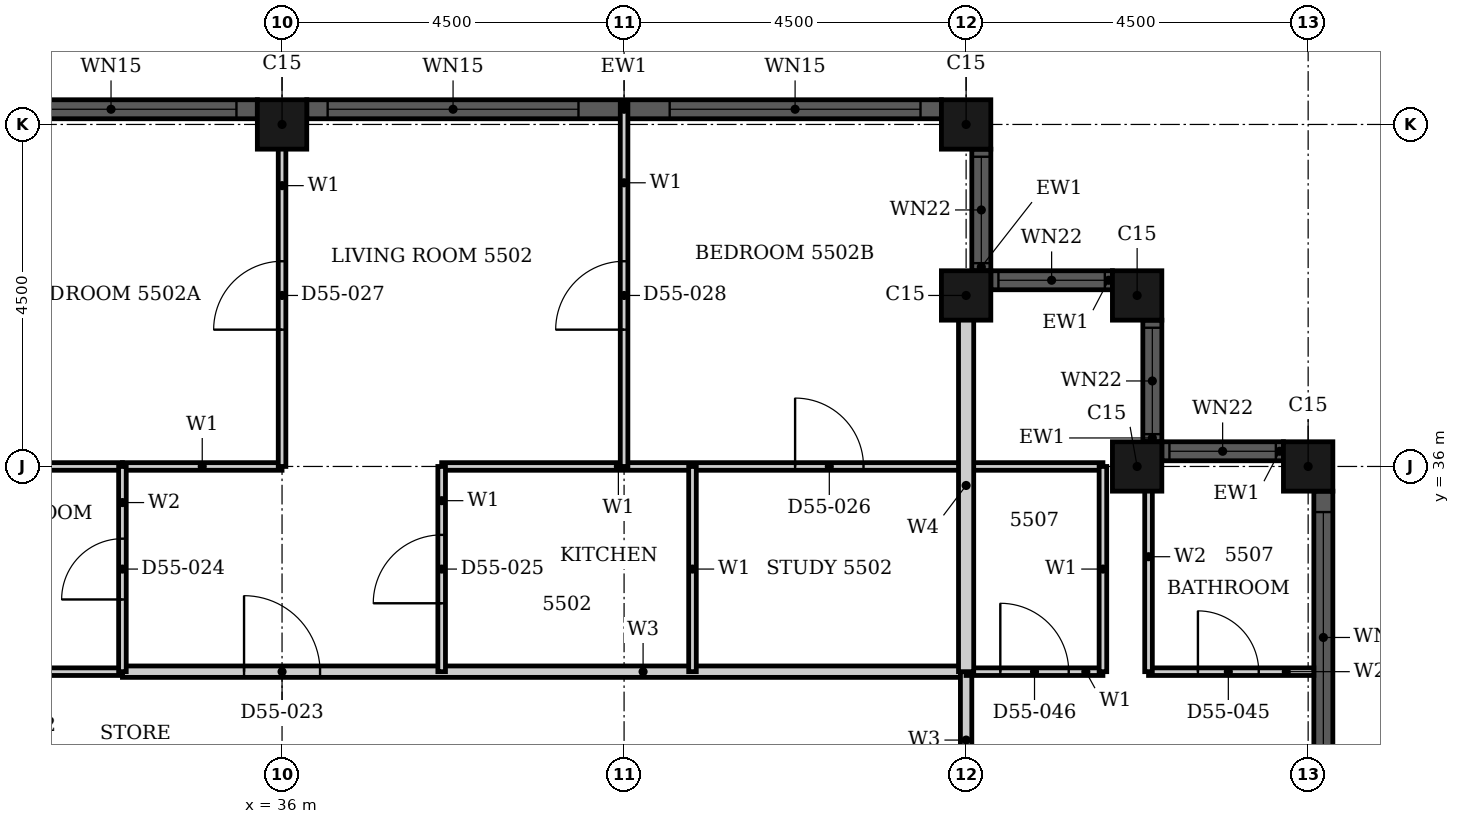
"""IFC4 building model, lengths in metres.
Left out: names, types, materials, properties, quantities, classifications, styles, units other than length and angle.
Written with IfcOpenShell. Run it as: python <this file> out.ifc"""

import sys

from ifc_helpers import new_model, si_unit, direction, frame, frame_2d, origin, origin_2d, place, context, subcontext, project, spatial, rectangle, hollow_rectangle, extrude, element, fill, save


model = new_model("IFC4")
c1 = context("Model", 3, precision=1e-05, world=origin(), true_north=direction((0.0, 1.0)))
c2 = subcontext(c1, "Body", "Model", "MODEL_VIEW")
j1 = project(units=[si_unit("LENGTHUNIT", "METRE"), si_unit("PLANEANGLEUNIT", "RADIAN")], contexts=[c1])
p1 = place(None, origin())
s1 = spatial("IfcSite", under=j1, at=p1, CompositionType="ELEMENT")
p2 = place(p1, origin())
s2 = spatial("IfcBuilding", under=s1, at=p2, CompositionType="ELEMENT")
p3 = place(p2, frame((0.0, 0.0, 218.3)))
s3 = spatial("IfcBuildingStorey", under=s2, at=p3, CompositionType="ELEMENT", Elevation=218.3)
for number, where, z_axis, x_axis in (
    (1, (49.5, 36.0, 0.0), (0.0, 0.0, 1.0), (1.0, 0.0, 0.0)),
    (2, (47.25, 36.0, 0.0), (0.0, 0.0, 1.0), (1.0, 0.0, 0.0)),
    (3, (47.25, 38.25, 0.0), (0.0, 0.0, 1.0), (1.0, 0.0, 0.0)),
    (4, (45.0, 38.25, 0.0), (0.0, 0.0, 1.0), (1.0, 0.0, 0.0)),
    (5, (45.0, 40.5, 0.0), (0.0, 0.0, 1.0), (1.0, 0.0, 0.0)),
    (6, (36.0, 40.5, 0.0), (0.0, 0.0, 1.0), (1.0, 0.0, 0.0)),
):
    element("IfcColumn", number, at=place(p3, frame(where, z_axis=z_axis, x_axis=x_axis)), inside=s3, PredefinedType="COLUMN", context=c2, shape_type="SweptSolid", body=[
        extrude(hollow_rectangle(XDim=0.65, YDim=0.65, WallThickness=0.021, at=origin_2d()), origin(), (0.0, 0.0, 1.0), 3.7),
    ])
p4 = place(p3, frame((49.7, 27.325, 0.0), z_axis=(0.0, 0.0, 1.0), x_axis=(0.0, 1.0, 0.0)))
e7 = element("IfcWall", 7, at=p4, inside=s3, PredefinedType="SOLIDWALL", context=c2, shape_type="SweptSolid", body=[
    extrude(rectangle(XDim=8.35, YDim=0.25, at=frame_2d((4.175, 0.0))), origin(), (0.0, 0.0, 1.0), 3.7),
])
p5 = place(p4, frame((0.275, 0.0, 0.45)))
e8 = element("IfcOpeningElement", 8, at=p5, cuts=e7, PredefinedType="OPENING", context=c2, shape_type="SweptSolid", body=[
    extrude(rectangle(XDim=3.3, YDim=2.3, at=frame_2d((1.65, 1.15))), frame((0.0, 0.135, 0.0), z_axis=(0.0, -1.0, 0.0), x_axis=(1.0, 0.0, 0.0)), (0.0, 0.0, 1.0), 0.27),
])
p6 = place(p4, frame((4.775, 0.0, 0.45)))
e9 = element("IfcOpeningElement", 9, at=p6, cuts=e7, PredefinedType="OPENING", context=c2, shape_type="SweptSolid", body=[
    extrude(rectangle(XDim=3.3, YDim=2.3, at=frame_2d((1.65, 1.15))), frame((0.0, 0.135, 0.0), z_axis=(0.0, -1.0, 0.0), x_axis=(1.0, 0.0, 0.0)), (0.0, 0.0, 1.0), 0.27),
])
p7 = place(p3, frame((49.175, 36.2, 0.0), z_axis=(0.0, 0.0, 1.0), x_axis=(-1.0, 0.0, 0.0)))
e10 = element("IfcWall", 10, at=p7, inside=s3, PredefinedType="SOLIDWALL", context=c2, shape_type="SweptSolid", body=[
    extrude(rectangle(XDim=1.6, YDim=0.25, at=frame_2d((0.8, 0.0))), origin(), (0.0, 0.0, 1.0), 3.7),
])
p8 = place(p7, frame((0.1, 0.0, 0.9)))
e11 = element("IfcOpeningElement", 11, at=p8, cuts=e10, PredefinedType="OPENING", context=c2, shape_type="SweptSolid", body=[
    extrude(rectangle(XDim=1.4, YDim=1.85, at=frame_2d((0.7, 0.925))), frame((0.0, 0.135, 0.0), z_axis=(0.0, -1.0, 0.0), x_axis=(1.0, 0.0, 0.0)), (0.0, 0.0, 1.0), 0.27),
])
p9 = place(p3, frame((47.45, 36.325, 0.0), z_axis=(0.0, 0.0, 1.0), x_axis=(0.0, 1.0, 0.0)))
e12 = element("IfcWall", 12, at=p9, inside=s3, PredefinedType="SOLIDWALL", context=c2, shape_type="SweptSolid", body=[
    extrude(rectangle(XDim=1.6, YDim=0.25, at=frame_2d((0.8, 0.0))), origin(), (0.0, 0.0, 1.0), 3.7),
])
p10 = place(p9, frame((0.1, 0.0, 0.9)))
e13 = element("IfcOpeningElement", 13, at=p10, cuts=e12, PredefinedType="OPENING", context=c2, shape_type="SweptSolid", body=[
    extrude(rectangle(XDim=1.4, YDim=1.85, at=frame_2d((0.7, 0.925))), frame((0.0, 0.135, 0.0), z_axis=(0.0, -1.0, 0.0), x_axis=(1.0, 0.0, 0.0)), (0.0, 0.0, 1.0), 0.27),
])
p11 = place(p3, frame((46.925, 38.45, 0.0), z_axis=(0.0, 0.0, 1.0), x_axis=(-1.0, 0.0, 0.0)))
e14 = element("IfcWall", 14, at=p11, inside=s3, PredefinedType="SOLIDWALL", context=c2, shape_type="SweptSolid", body=[
    extrude(rectangle(XDim=1.6, YDim=0.25, at=frame_2d((0.8, 0.0))), origin(), (0.0, 0.0, 1.0), 3.7),
])
p12 = place(p11, frame((0.1, 0.0, 0.9)))
e15 = element("IfcOpeningElement", 15, at=p12, cuts=e14, PredefinedType="OPENING", context=c2, shape_type="SweptSolid", body=[
    extrude(rectangle(XDim=1.4, YDim=1.85, at=frame_2d((0.7, 0.925))), frame((0.0, 0.135, 0.0), z_axis=(0.0, -1.0, 0.0), x_axis=(1.0, 0.0, 0.0)), (0.0, 0.0, 1.0), 0.27),
])
p13 = place(p3, frame((45.2, 38.575, 0.0), z_axis=(0.0, 0.0, 1.0), x_axis=(0.0, 1.0, 0.0)))
e16 = element("IfcWall", 16, at=p13, inside=s3, PredefinedType="SOLIDWALL", context=c2, shape_type="SweptSolid", body=[
    extrude(rectangle(XDim=1.6, YDim=0.25, at=frame_2d((0.8, 0.0))), origin(), (0.0, 0.0, 1.0), 3.7),
])
p14 = place(p13, frame((0.1, 0.0, 0.9)))
e17 = element("IfcOpeningElement", 17, at=p14, cuts=e16, PredefinedType="OPENING", context=c2, shape_type="SweptSolid", body=[
    extrude(rectangle(XDim=1.4, YDim=1.85, at=frame_2d((0.7, 0.925))), frame((0.0, 0.135, 0.0), z_axis=(0.0, -1.0, 0.0), x_axis=(1.0, 0.0, 0.0)), (0.0, 0.0, 1.0), 0.27),
])
p15 = place(p3, frame((44.675, 40.7, 0.0), z_axis=(0.0, 0.0, 1.0), x_axis=(-1.0, 0.0, 0.0)))
e18 = element("IfcWall", 18, at=p15, inside=s3, PredefinedType="SOLIDWALL", context=c2, shape_type="SweptSolid", body=[
    extrude(rectangle(XDim=8.35, YDim=0.25, at=frame_2d((4.175, 0.0))), origin(), (0.0, 0.0, 1.0), 3.7),
])
p16 = place(p15, frame((0.275, 0.0, 0.45)))
e19 = element("IfcOpeningElement", 19, at=p16, cuts=e18, PredefinedType="OPENING", context=c2, shape_type="SweptSolid", body=[
    extrude(rectangle(XDim=3.3, YDim=2.3, at=frame_2d((1.65, 1.15))), frame((0.0, 0.135, 0.0), z_axis=(0.0, -1.0, 0.0), x_axis=(1.0, 0.0, 0.0)), (0.0, 0.0, 1.0), 0.27),
])
p17 = place(p15, frame((4.775, 0.0, 0.45)))
e20 = element("IfcOpeningElement", 20, at=p17, cuts=e18, PredefinedType="OPENING", context=c2, shape_type="SweptSolid", body=[
    extrude(rectangle(XDim=3.3, YDim=2.3, at=frame_2d((1.65, 1.15))), frame((0.0, 0.135, 0.0), z_axis=(0.0, -1.0, 0.0), x_axis=(1.0, 0.0, 0.0)), (0.0, 0.0, 1.0), 0.27),
])
p18 = place(p3, frame((35.675, 40.7, 0.0), z_axis=(0.0, 0.0, 1.0), x_axis=(-1.0, 0.0, 0.0)))
e21 = element("IfcWall", 21, at=p18, inside=s3, PredefinedType="SOLIDWALL", context=c2, shape_type="SweptSolid", body=[
    extrude(rectangle(XDim=8.35, YDim=0.25, at=frame_2d((4.175, 0.0))), origin(), (0.0, 0.0, 1.0), 3.7),
])
p19 = place(p18, frame((0.275, 0.0, 0.45)))
e22 = element("IfcOpeningElement", 22, at=p19, cuts=e21, PredefinedType="OPENING", context=c2, shape_type="SweptSolid", body=[
    extrude(rectangle(XDim=3.3, YDim=2.3, at=frame_2d((1.65, 1.15))), frame((0.0, 0.135, 0.0), z_axis=(0.0, -1.0, 0.0), x_axis=(1.0, 0.0, 0.0)), (0.0, 0.0, 1.0), 0.27),
])
p20 = place(p18, frame((4.775, 0.0, 0.45)))
e23 = element("IfcOpeningElement", 23, at=p20, cuts=e21, PredefinedType="OPENING", context=c2, shape_type="SweptSolid", body=[
    extrude(rectangle(XDim=3.3, YDim=2.3, at=frame_2d((1.65, 1.15))), frame((0.0, 0.135, 0.0), z_axis=(0.0, -1.0, 0.0), x_axis=(1.0, 0.0, 0.0)), (0.0, 0.0, 1.0), 0.27),
])
p21 = place(p3, frame((33.9, 33.3, 0.0), z_axis=(0.0, 0.0, 1.0), x_axis=(1.0, 0.0, 0.0)))
e24 = element("IfcWall", 24, at=p21, inside=s3, PredefinedType="PARTITIONING", context=c2, shape_type="SweptSolid", body=[
    extrude(rectangle(XDim=11.1, YDim=0.15, at=frame_2d((5.55, 0.0))), origin(), (0.0, 0.0, 1.0), 3.4),
])
p22 = place(p21, frame((1.6, 0.0, 0.0)))
e25 = element("IfcOpeningElement", 25, at=p22, cuts=e24, PredefinedType="OPENING", context=c2, shape_type="SweptSolid", body=[
    extrude(rectangle(XDim=1.0, YDim=2.2, at=frame_2d((0.5, 1.1))), frame((0.0, 0.085, 0.0), z_axis=(0.0, -1.0, 0.0), x_axis=(1.0, 0.0, 0.0)), (0.0, 0.0, 1.0), 0.17),
])
p23 = place(p3, frame((45.0, 31.5, 0.0), z_axis=(0.0, 0.0, 1.0), x_axis=(0.0, 1.0, 0.0)))
e26 = element("IfcWall", 26, at=p23, inside=s3, PredefinedType="PARTITIONING", context=c2, shape_type="SweptSolid", body=[
    extrude(rectangle(XDim=1.8, YDim=0.15, at=frame_2d((0.9, 0.0))), origin(), (0.0, 0.0, 1.0), 3.4),
])
p24 = place(p3, frame((45.0, 33.3, 0.0), z_axis=(0.0, 0.0, 1.0), x_axis=(1.0, 0.0, 0.0)))
e27 = element("IfcWall", 27, at=p24, inside=s3, PredefinedType="PARTITIONING", context=c2, shape_type="SweptSolid", body=[
    extrude(rectangle(XDim=1.8, YDim=0.1, at=frame_2d((0.9, 0.0))), origin(), (0.0, 0.0, 1.0), 3.4),
])
p25 = place(p24, frame((0.45, 0.0, 0.0)))
e28 = element("IfcOpeningElement", 28, at=p25, cuts=e27, PredefinedType="OPENING", context=c2, shape_type="SweptSolid", body=[
    extrude(rectangle(XDim=0.9, YDim=2.1, at=frame_2d((0.45, 1.05))), frame((0.0, 0.06, 0.0), z_axis=(0.0, -1.0, 0.0), x_axis=(1.0, 0.0, 0.0)), (0.0, 0.0, 1.0), 0.12),
])
p26 = place(p3, frame((33.9, 36.0, 0.0), z_axis=(0.0, 0.0, 1.0), x_axis=(1.0, 0.0, 0.0)))
e29 = element("IfcWall", 29, at=p26, inside=s3, PredefinedType="PARTITIONING", context=c2, shape_type="SweptSolid", body=[
    extrude(rectangle(XDim=2.1, YDim=0.1, at=frame_2d((1.05, 0.0))), origin(), (0.0, 0.0, 1.0), 3.4),
])
p27 = place(p3, frame((38.1, 36.0, 0.0), z_axis=(0.0, 0.0, 1.0), x_axis=(1.0, 0.0, 0.0)))
e30 = element("IfcWall", 30, at=p27, inside=s3, PredefinedType="PARTITIONING", context=c2, shape_type="SweptSolid", body=[
    extrude(rectangle(XDim=8.7, YDim=0.1, at=frame_2d((4.35, 0.0))), origin(), (0.0, 0.0, 1.0), 3.4),
])
p28 = place(p27, frame((4.65, 0.0, 0.0)))
e31 = element("IfcOpeningElement", 31, at=p28, cuts=e30, PredefinedType="OPENING", context=c2, shape_type="SweptSolid", body=[
    extrude(rectangle(XDim=0.9, YDim=2.1, at=frame_2d((0.45, 1.05))), frame((0.0, 0.06, 0.0), z_axis=(0.0, -1.0, 0.0), x_axis=(1.0, 0.0, 0.0)), (0.0, 0.0, 1.0), 0.12),
])
p29 = place(p3, frame((36.0, 36.0, 0.0), z_axis=(0.0, 0.0, 1.0), x_axis=(0.0, 1.0, 0.0)))
e32 = element("IfcWall", 32, at=p29, inside=s3, PredefinedType="PARTITIONING", context=c2, shape_type="SweptSolid", body=[
    extrude(rectangle(XDim=4.69, YDim=0.1, at=frame_2d((2.345, 0.0))), origin(), (0.0, 0.0, 1.0), 3.4),
])
p30 = place(p29, frame((1.8, 0.0, 0.0)))
e33 = element("IfcOpeningElement", 33, at=p30, cuts=e32, PredefinedType="OPENING", context=c2, shape_type="SweptSolid", body=[
    extrude(rectangle(XDim=0.9, YDim=2.1, at=frame_2d((0.45, 1.05))), frame((0.0, 0.06, 0.0), z_axis=(0.0, -1.0, 0.0), x_axis=(1.0, 0.0, 0.0)), (0.0, 0.0, 1.0), 0.12),
])
p31 = place(p3, frame((38.1, 33.3, 0.0), z_axis=(0.0, 0.0, 1.0), x_axis=(0.0, 1.0, 0.0)))
e34 = element("IfcWall", 34, at=p31, inside=s3, PredefinedType="PARTITIONING", context=c2, shape_type="SweptSolid", body=[
    extrude(rectangle(XDim=2.7, YDim=0.1, at=frame_2d((1.35, 0.0))), origin(), (0.0, 0.0, 1.0), 3.4),
])
p32 = place(p31, frame((0.9, 0.0, 0.0)))
e35 = element("IfcOpeningElement", 35, at=p32, cuts=e34, PredefinedType="OPENING", context=c2, shape_type="SweptSolid", body=[
    extrude(rectangle(XDim=0.9, YDim=2.1, at=frame_2d((0.45, 1.05))), frame((0.0, 0.06, 0.0), z_axis=(0.0, -1.0, 0.0), x_axis=(1.0, 0.0, 0.0)), (0.0, 0.0, 1.0), 0.12),
])
p33 = place(p3, frame((40.5, 36.0, 0.0), z_axis=(0.0, 0.0, 1.0), x_axis=(0.0, 1.0, 0.0)))
e36 = element("IfcWall", 36, at=p33, inside=s3, PredefinedType="PARTITIONING", context=c2, shape_type="SweptSolid", body=[
    extrude(rectangle(XDim=4.765, YDim=0.1, at=frame_2d((2.382, 0.0))), origin(), (0.0, 0.0, 1.0), 3.4),
])
p34 = place(p33, frame((1.8, 0.0, 0.0)))
e37 = element("IfcOpeningElement", 37, at=p34, cuts=e36, PredefinedType="OPENING", context=c2, shape_type="SweptSolid", body=[
    extrude(rectangle(XDim=0.9, YDim=2.1, at=frame_2d((0.45, 1.05))), frame((0.0, 0.06, 0.0), z_axis=(0.0, -1.0, 0.0), x_axis=(1.0, 0.0, 0.0)), (0.0, 0.0, 1.0), 0.12),
])
for number, where, z_axis, x_axis in (
    (38, (41.4, 33.3, 0.0), (0.0, 0.0, 1.0), (0.0, 1.0, 0.0)),
    (39, (46.8, 33.3, 0.0), (0.0, 0.0, 1.0), (0.0, 1.0, 0.0)),
):
    element("IfcWall", number, at=place(p3, frame(where, z_axis=z_axis, x_axis=x_axis)), inside=s3, PredefinedType="PARTITIONING", context=c2, shape_type="SweptSolid", body=[
        extrude(rectangle(XDim=2.7, YDim=0.1, at=frame_2d((1.35, 0.0))), origin(), (0.0, 0.0, 1.0), 3.4),
    ])
p35 = place(p3, frame((45.0, 33.3, 0.0), z_axis=(0.0, 0.0, 1.0), x_axis=(0.0, 1.0, 0.0)))
e40 = element("IfcWall", 40, at=p35, inside=s3, PredefinedType="PARTITIONING", context=c2, shape_type="SweptSolid", body=[
    extrude(rectangle(XDim=4.9, YDim=0.2, at=frame_2d((2.45, 0.0))), origin(), (0.0, 0.0, 1.0), 3.4),
])
p36 = place(p3, frame((31.5, 33.3, 0.0), z_axis=(0.0, 0.0, 1.0), x_axis=(1.0, 0.0, 0.0)))
e41 = element("IfcWall", 41, at=p36, inside=s3, PredefinedType="PARTITIONING", context=c2, shape_type="SweptSolid", body=[
    extrude(rectangle(XDim=2.4, YDim=0.1, at=frame_2d((1.2, 0.0))), origin(), (0.0, 0.0, 1.0), 3.4),
])
p37 = place(p3, frame((47.4, 33.3, 0.0), z_axis=(0.0, 0.0, 1.0), x_axis=(1.0, 0.0, 0.0)))
e42 = element("IfcWall", 42, at=p37, inside=s3, PredefinedType="PARTITIONING", context=c2, shape_type="SweptSolid", body=[
    extrude(rectangle(XDim=2.175, YDim=0.1, at=frame_2d((1.087, 0.0))), origin(), (0.0, 0.0, 1.0), 3.4),
])
p38 = place(p37, frame((0.65, 0.0, 0.0)))
e43 = element("IfcOpeningElement", 43, at=p38, cuts=e42, PredefinedType="OPENING", context=c2, shape_type="SweptSolid", body=[
    extrude(rectangle(XDim=0.8, YDim=2.1, at=frame_2d((0.4, 1.05))), frame((0.0, 0.06, 0.0), z_axis=(0.0, -1.0, 0.0), x_axis=(1.0, 0.0, 0.0)), (0.0, 0.0, 1.0), 0.12),
])
p39 = place(p3, frame((31.5, 36.0, 0.0), z_axis=(0.0, 0.0, 1.0), x_axis=(1.0, 0.0, 0.0)))
e44 = element("IfcWall", 44, at=p39, inside=s3, PredefinedType="PARTITIONING", context=c2, shape_type="SweptSolid", body=[
    extrude(rectangle(XDim=2.4, YDim=0.1, at=frame_2d((1.2, 0.0))), origin(), (0.0, 0.0, 1.0), 3.4),
])
p40 = place(p3, frame((33.9, 33.3, 0.0), z_axis=(0.0, 0.0, 1.0), x_axis=(0.0, 1.0, 0.0)))
e45 = element("IfcWall", 45, at=p40, inside=s3, PredefinedType="PARTITIONING", context=c2, shape_type="SweptSolid", body=[
    extrude(rectangle(XDim=2.7, YDim=0.1, at=frame_2d((1.35, 0.0))), origin(), (0.0, 0.0, 1.0), 3.4),
])
p41 = place(p40, frame((0.95, 0.0, 0.0)))
e46 = element("IfcOpeningElement", 46, at=p41, cuts=e45, PredefinedType="OPENING", context=c2, shape_type="SweptSolid", body=[
    extrude(rectangle(XDim=0.8, YDim=2.1, at=frame_2d((0.4, 1.05))), frame((0.0, 0.06, 0.0), z_axis=(0.0, -1.0, 0.0), x_axis=(1.0, 0.0, 0.0)), (0.0, 0.0, 1.0), 0.12),
])
p42 = place(p3, frame((47.4, 33.3, 0.0), z_axis=(0.0, 0.0, 1.0), x_axis=(0.0, 1.0, 0.0)))
e47 = element("IfcWall", 47, at=p42, inside=s3, PredefinedType="PARTITIONING", context=c2, shape_type="SweptSolid", body=[
    extrude(rectangle(XDim=3.025, YDim=0.1, at=frame_2d((1.512, 0.0))), origin(), (0.0, 0.0, 1.0), 3.4),
])
p43 = place(p6, origin())
e48 = element("IfcWindow", 48, at=p43, inside=s3, PartitioningType="SINGLE_PANEL", PredefinedType="WINDOW", context=c2, shape_type="SweptSolid", body=[
    extrude(rectangle(XDim=3.3, YDim=2.3, at=frame_2d((1.65, 1.15))), frame((0.0, 0.03, 0.0), z_axis=(0.0, -1.0, 0.0), x_axis=(1.0, 0.0, 0.0)), (0.0, 0.0, 1.0), 0.06),
])
fill(e9, e48)
p44 = place(p8, origin())
e49 = element("IfcWindow", 49, at=p44, inside=s3, PartitioningType="SINGLE_PANEL", PredefinedType="WINDOW", context=c2, shape_type="SweptSolid", body=[
    extrude(rectangle(XDim=1.4, YDim=1.85, at=frame_2d((0.7, 0.925))), frame((0.0, 0.03, 0.0), z_axis=(0.0, -1.0, 0.0), x_axis=(1.0, 0.0, 0.0)), (0.0, 0.0, 1.0), 0.06),
])
fill(e11, e49)
p45 = place(p10, origin())
e50 = element("IfcWindow", 50, at=p45, inside=s3, PartitioningType="SINGLE_PANEL", PredefinedType="WINDOW", context=c2, shape_type="SweptSolid", body=[
    extrude(rectangle(XDim=1.4, YDim=1.85, at=frame_2d((0.7, 0.925))), frame((0.0, 0.03, 0.0), z_axis=(0.0, -1.0, 0.0), x_axis=(1.0, 0.0, 0.0)), (0.0, 0.0, 1.0), 0.06),
])
fill(e13, e50)
p46 = place(p12, origin())
e51 = element("IfcWindow", 51, at=p46, inside=s3, PartitioningType="SINGLE_PANEL", PredefinedType="WINDOW", context=c2, shape_type="SweptSolid", body=[
    extrude(rectangle(XDim=1.4, YDim=1.85, at=frame_2d((0.7, 0.925))), frame((0.0, 0.03, 0.0), z_axis=(0.0, -1.0, 0.0), x_axis=(1.0, 0.0, 0.0)), (0.0, 0.0, 1.0), 0.06),
])
fill(e15, e51)
p47 = place(p14, origin())
e52 = element("IfcWindow", 52, at=p47, inside=s3, PartitioningType="SINGLE_PANEL", PredefinedType="WINDOW", context=c2, shape_type="SweptSolid", body=[
    extrude(rectangle(XDim=1.4, YDim=1.85, at=frame_2d((0.7, 0.925))), frame((0.0, 0.03, 0.0), z_axis=(0.0, -1.0, 0.0), x_axis=(1.0, 0.0, 0.0)), (0.0, 0.0, 1.0), 0.06),
])
fill(e17, e52)
p48 = place(p16, origin())
e53 = element("IfcWindow", 53, at=p48, inside=s3, PartitioningType="SINGLE_PANEL", PredefinedType="WINDOW", context=c2, shape_type="SweptSolid", body=[
    extrude(rectangle(XDim=3.3, YDim=2.3, at=frame_2d((1.65, 1.15))), frame((0.0, 0.03, 0.0), z_axis=(0.0, -1.0, 0.0), x_axis=(1.0, 0.0, 0.0)), (0.0, 0.0, 1.0), 0.06),
])
fill(e19, e53)
p49 = place(p17, origin())
e54 = element("IfcWindow", 54, at=p49, inside=s3, PartitioningType="SINGLE_PANEL", PredefinedType="WINDOW", context=c2, shape_type="SweptSolid", body=[
    extrude(rectangle(XDim=3.3, YDim=2.3, at=frame_2d((1.65, 1.15))), frame((0.0, 0.03, 0.0), z_axis=(0.0, -1.0, 0.0), x_axis=(1.0, 0.0, 0.0)), (0.0, 0.0, 1.0), 0.06),
])
fill(e20, e54)
p50 = place(p19, origin())
e55 = element("IfcWindow", 55, at=p50, inside=s3, PartitioningType="SINGLE_PANEL", PredefinedType="WINDOW", context=c2, shape_type="SweptSolid", body=[
    extrude(rectangle(XDim=3.3, YDim=2.3, at=frame_2d((1.65, 1.15))), frame((0.0, 0.03, 0.0), z_axis=(0.0, -1.0, 0.0), x_axis=(1.0, 0.0, 0.0)), (0.0, 0.0, 1.0), 0.06),
])
fill(e22, e55)
p51 = place(p22, origin())
e56 = element("IfcDoor", 56, at=p51, inside=s3, OperationType="SINGLE_SWING_LEFT", PredefinedType="DOOR", context=c2, shape_type="SweptSolid", body=[
    extrude(rectangle(XDim=1.0, YDim=2.2, at=frame_2d((0.5, 1.1))), frame((0.0, 0.025, 0.0), z_axis=(0.0, -1.0, 0.0), x_axis=(1.0, 0.0, 0.0)), (0.0, 0.0, 1.0), 0.05),
])
fill(e25, e56)
p52 = place(p41, origin())
e57 = element("IfcDoor", 57, at=p52, inside=s3, OperationType="SINGLE_SWING_LEFT", PredefinedType="DOOR", context=c2, shape_type="SweptSolid", body=[
    extrude(rectangle(XDim=0.8, YDim=2.1, at=frame_2d((0.4, 1.05))), frame((0.0, 0.025, 0.0), z_axis=(0.0, -1.0, 0.0), x_axis=(1.0, 0.0, 0.0)), (0.0, 0.0, 1.0), 0.05),
])
fill(e46, e57)
p53 = place(p32, origin())
e58 = element("IfcDoor", 58, at=p53, inside=s3, OperationType="SINGLE_SWING_LEFT", PredefinedType="DOOR", context=c2, shape_type="SweptSolid", body=[
    extrude(rectangle(XDim=0.9, YDim=2.1, at=frame_2d((0.45, 1.05))), frame((0.0, 0.025, 0.0), z_axis=(0.0, -1.0, 0.0), x_axis=(1.0, 0.0, 0.0)), (0.0, 0.0, 1.0), 0.05),
])
fill(e35, e58)
p54 = place(p28, origin())
e59 = element("IfcDoor", 59, at=p54, inside=s3, OperationType="SINGLE_SWING_LEFT", PredefinedType="DOOR", context=c2, shape_type="SweptSolid", body=[
    extrude(rectangle(XDim=0.9, YDim=2.1, at=frame_2d((0.45, 1.05))), frame((0.0, 0.025, 0.0), z_axis=(0.0, -1.0, 0.0), x_axis=(1.0, 0.0, 0.0)), (0.0, 0.0, 1.0), 0.05),
])
fill(e31, e59)
p55 = place(p30, origin())
e60 = element("IfcDoor", 60, at=p55, inside=s3, OperationType="SINGLE_SWING_LEFT", PredefinedType="DOOR", context=c2, shape_type="SweptSolid", body=[
    extrude(rectangle(XDim=0.9, YDim=2.1, at=frame_2d((0.45, 1.05))), frame((0.0, 0.025, 0.0), z_axis=(0.0, -1.0, 0.0), x_axis=(1.0, 0.0, 0.0)), (0.0, 0.0, 1.0), 0.05),
])
fill(e33, e60)
p56 = place(p34, origin())
e61 = element("IfcDoor", 61, at=p56, inside=s3, OperationType="SINGLE_SWING_RIGHT", PredefinedType="DOOR", context=c2, shape_type="SweptSolid", body=[
    extrude(rectangle(XDim=0.9, YDim=2.1, at=frame_2d((0.45, 1.05))), frame((0.0, 0.025, 0.0), z_axis=(0.0, -1.0, 0.0), x_axis=(1.0, 0.0, 0.0)), (0.0, 0.0, 1.0), 0.05),
])
fill(e37, e61)
p57 = place(p38, origin())
e62 = element("IfcDoor", 62, at=p57, inside=s3, OperationType="SINGLE_SWING_LEFT", PredefinedType="DOOR", context=c2, shape_type="SweptSolid", body=[
    extrude(rectangle(XDim=0.8, YDim=2.1, at=frame_2d((0.4, 1.05))), frame((0.0, 0.025, 0.0), z_axis=(0.0, -1.0, 0.0), x_axis=(1.0, 0.0, 0.0)), (0.0, 0.0, 1.0), 0.05),
])
fill(e43, e62)
p58 = place(p25, origin())
e63 = element("IfcDoor", 63, at=p58, inside=s3, OperationType="SINGLE_SWING_RIGHT", PredefinedType="DOOR", context=c2, shape_type="SweptSolid", body=[
    extrude(rectangle(XDim=0.9, YDim=2.1, at=frame_2d((0.45, 1.05))), frame((0.0, 0.025, 0.0), z_axis=(0.0, -1.0, 0.0), x_axis=(1.0, 0.0, 0.0)), (0.0, 0.0, 1.0), 0.05),
])
fill(e28, e63)
save(model, sys.argv[1])
